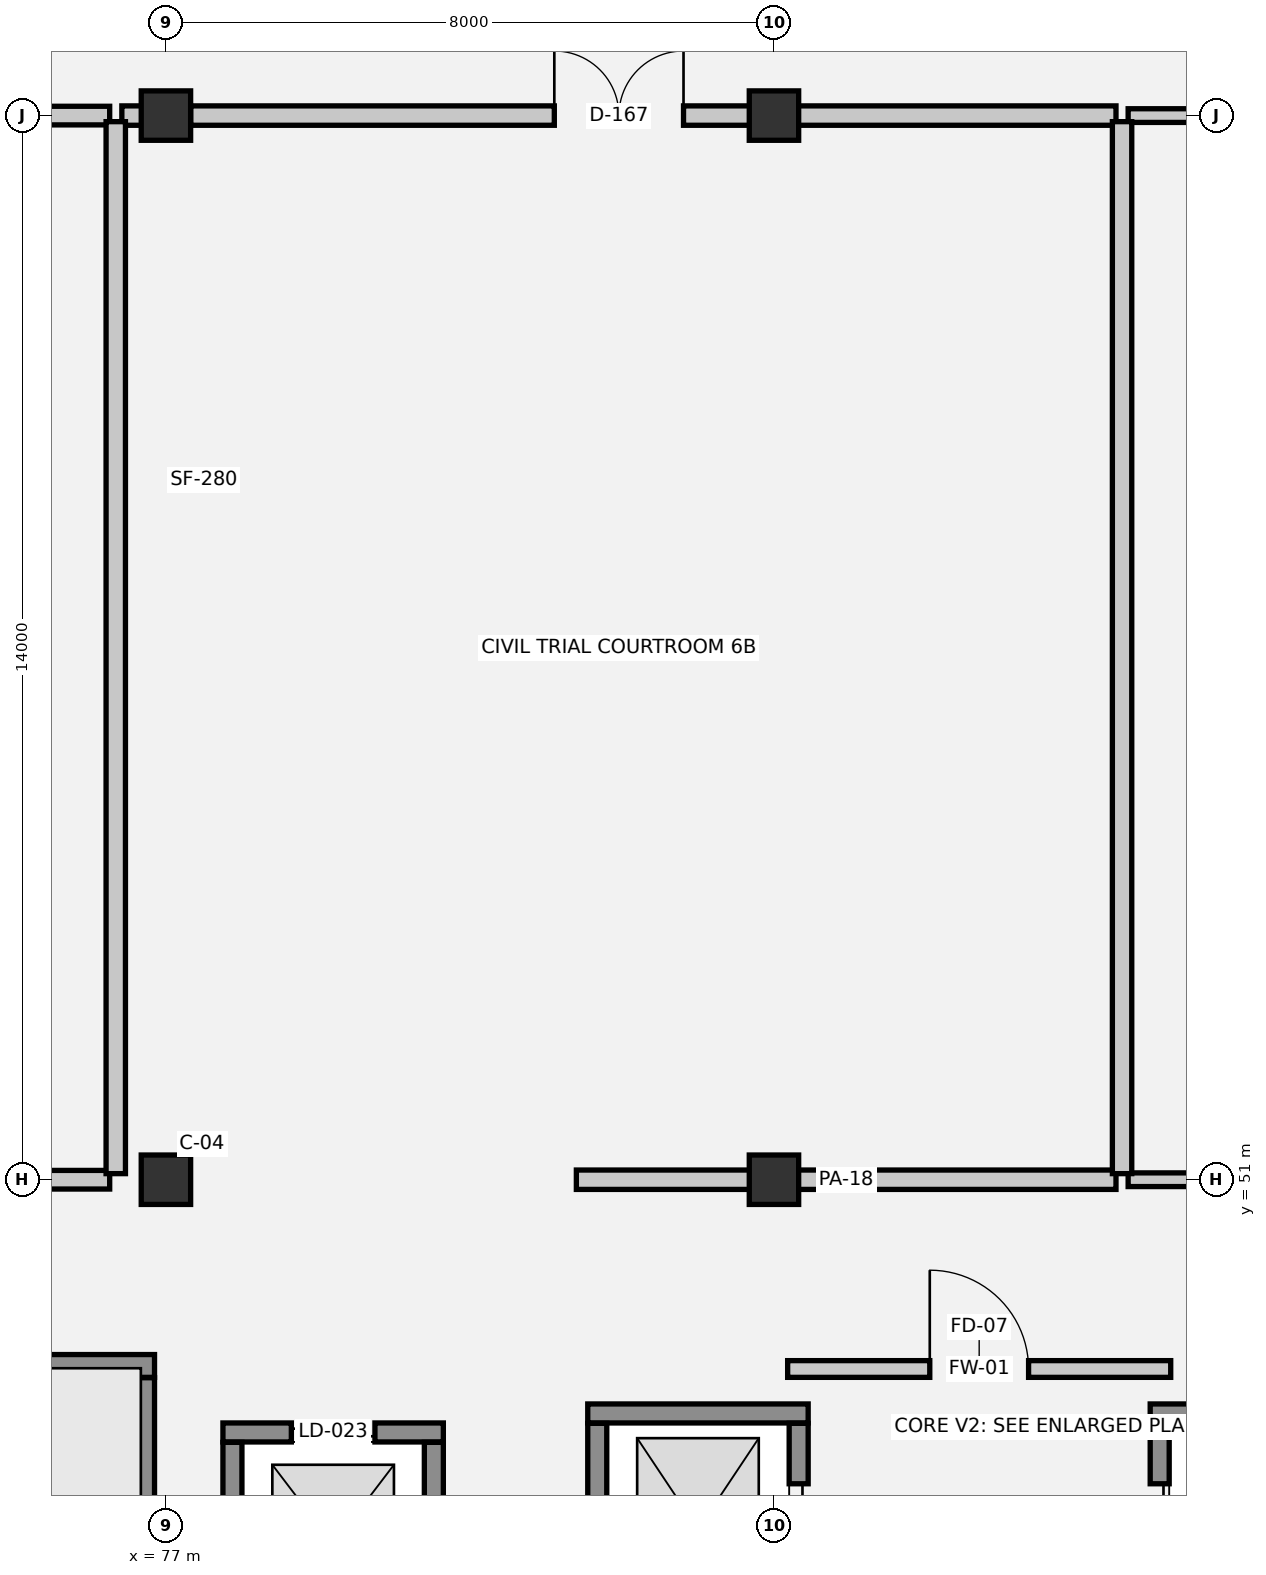
"""IFC4 building model, lengths in metres.
Left out: names, types, materials, properties, quantities, classifications, styles, units other than length and angle.
Written with IfcOpenShell. Run it as: python <this file> out.ifc"""

import sys

from ifc_helpers import new_model, si_unit, direction, frame, frame_2d, origin, origin_2d, place, context, subcontext, project, spatial, rectangle, extrude, element, fill, save


model = new_model("IFC4")
c1 = context("Model", 3, precision=1e-05, world=origin(), true_north=direction((0.0, 1.0)))
c2 = subcontext(c1, "Body", "Model", "MODEL_VIEW")
j1 = project(units=[si_unit("LENGTHUNIT", "METRE"), si_unit("PLANEANGLEUNIT", "RADIAN")], contexts=[c1])
p1 = place(None, origin())
s1 = spatial("IfcSite", under=j1, at=p1, CompositionType="ELEMENT")
p2 = place(p1, origin())
s2 = spatial("IfcBuilding", under=s1, at=p2, CompositionType="ELEMENT")
p3 = place(p2, frame((0.0, 0.0, 22.05)))
s3 = spatial("IfcBuildingStorey", under=s2, at=p3, CompositionType="ELEMENT", Elevation=22.05)
for number, where, z_axis, x_axis in (
    (1, (77.0, 51.0, 0.0), (0.0, 0.0, 1.0), (1.0, 0.0, 0.0)),
    (2, (77.0, 65.0, 0.0), (0.0, 0.0, 1.0), (1.0, 0.0, 0.0)),
    (3, (85.0, 51.0, 0.0), (0.0, 0.0, 1.0), (1.0, 0.0, 0.0)),
    (4, (85.0, 65.0, 0.0), (0.0, 0.0, 1.0), (1.0, 0.0, 0.0)),
):
    element("IfcColumn", number, at=place(p3, frame(where, z_axis=z_axis, x_axis=x_axis)), inside=s3, PredefinedType="COLUMN", context=c2, shape_type="SweptSolid", body=[
        extrude(rectangle(XDim=0.65, YDim=0.65, at=origin_2d()), origin(), (0.0, 0.0, 1.0), 3.75),
    ])
p4 = place(p3, frame((80.65, 47.675, 0.0), z_axis=(0.0, 0.0, 1.0), x_axis=(-1.0, 0.0, 0.0)))
e5 = element("IfcWall", 5, at=p4, inside=s3, PredefinedType="SHEAR", context=c2, shape_type="SweptSolid", body=[
    extrude(rectangle(XDim=2.9, YDim=0.25, at=frame_2d((1.45, 0.0))), origin(), (0.0, 0.0, 1.0), 3.75),
])
p5 = place(p4, frame((0.9, 0.0, 0.0)))
e6 = element("IfcOpeningElement", 6, at=p5, cuts=e5, PredefinedType="OPENING", context=c2, shape_type="SweptSolid", body=[
    extrude(rectangle(XDim=1.1, YDim=2.15, at=frame_2d((0.55, 1.075))), frame((0.0, 0.135, 0.0), z_axis=(0.0, -1.0, 0.0), x_axis=(1.0, 0.0, 0.0)), (0.0, 0.0, 1.0), 0.27),
])
for number, where, z_axis, x_axis in (
    (7, (77.875, 47.545, 0.0), (0.0, 0.0, 1.0), (0.0, -1.0, 0.0)),
    (8, (80.525, 44.855, 0.0), (0.0, 0.0, 1.0), (0.0, 1.0, 0.0)),
):
    element("IfcWall", number, at=place(p3, frame(where, z_axis=z_axis, x_axis=x_axis)), inside=s3, PredefinedType="SHEAR", context=c2, shape_type="SweptSolid", body=[
        extrude(rectangle(XDim=2.69, YDim=0.25, at=frame_2d((1.345, 0.0))), origin(), (0.0, 0.0, 1.0), 3.75),
    ])
p6 = place(p3, frame((85.45, 47.925, 0.0), z_axis=(0.0, 0.0, 1.0), x_axis=(-1.0, 0.0, 0.0)))
e9 = element("IfcWall", 9, at=p6, inside=s3, PredefinedType="SHEAR", context=c2, shape_type="SweptSolid", body=[
    extrude(rectangle(XDim=2.9, YDim=0.25, at=frame_2d((1.45, 0.0))), origin(), (0.0, 0.0, 1.0), 3.75),
])
p7 = place(p3, frame((82.675, 47.795, 0.0), z_axis=(0.0, 0.0, 1.0), x_axis=(0.0, -1.0, 0.0)))
e10 = element("IfcWall", 10, at=p7, inside=s3, PredefinedType="SHEAR", context=c2, shape_type="SweptSolid", body=[
    extrude(rectangle(XDim=2.79, YDim=0.25, at=frame_2d((1.395, 0.0))), origin(), (0.0, 0.0, 1.0), 3.75),
])
p8 = place(p3, frame((85.325, 45.005, 0.0), z_axis=(0.0, 0.0, 1.0), x_axis=(0.0, 1.0, 0.0)))
e11 = element("IfcWall", 11, at=p8, inside=s3, PredefinedType="SHEAR", context=c2, shape_type="SweptSolid", body=[
    extrude(rectangle(XDim=2.79, YDim=0.25, at=frame_2d((1.395, 0.0))), origin(), (0.0, 0.0, 1.0), 3.75),
])
p9 = place(p8, frame((0.795, 0.0, 0.0)))
e12 = element("IfcOpeningElement", 12, at=p9, cuts=e11, PredefinedType="OPENING", context=c2, shape_type="SweptSolid", body=[
    extrude(rectangle(XDim=1.2, YDim=2.2, at=frame_2d((0.6, 1.1))), frame((0.0, 0.135, 0.0), z_axis=(0.0, -1.0, 0.0), x_axis=(1.0, 0.0, 0.0)), (0.0, 0.0, 1.0), 0.27),
])
p10 = place(p3, frame((92.85, 47.925, 0.0), z_axis=(0.0, 0.0, 1.0), x_axis=(-1.0, 0.0, 0.0)))
e13 = element("IfcWall", 13, at=p10, inside=s3, PredefinedType="SHEAR", context=c2, shape_type="SweptSolid", body=[
    extrude(rectangle(XDim=2.9, YDim=0.25, at=frame_2d((1.45, 0.0))), origin(), (0.0, 0.0, 1.0), 3.75),
])
p11 = place(p3, frame((90.075, 47.795, 0.0), z_axis=(0.0, 0.0, 1.0), x_axis=(0.0, -1.0, 0.0)))
e14 = element("IfcWall", 14, at=p11, inside=s3, PredefinedType="SHEAR", context=c2, shape_type="SweptSolid", body=[
    extrude(rectangle(XDim=2.79, YDim=0.25, at=frame_2d((1.395, 0.0))), origin(), (0.0, 0.0, 1.0), 3.75),
])
p12 = place(p11, frame((0.795, 0.0, 0.0)))
e15 = element("IfcOpeningElement", 15, at=p12, cuts=e14, PredefinedType="OPENING", context=c2, shape_type="SweptSolid", body=[
    extrude(rectangle(XDim=1.2, YDim=2.2, at=frame_2d((0.6, 1.1))), frame((0.0, 0.135, 0.0), z_axis=(0.0, -1.0, 0.0), x_axis=(1.0, 0.0, 0.0)), (0.0, 0.0, 1.0), 0.27),
])
p13 = place(p3, frame((76.85, 48.55, 0.0), z_axis=(0.0, 0.0, 1.0), x_axis=(-1.0, 0.0, 0.0)))
e16 = element("IfcWall", 16, at=p13, inside=s3, PredefinedType="SHEAR", context=c2, shape_type="SweptSolid", body=[
    extrude(rectangle(XDim=7.7, YDim=0.3, at=frame_2d((3.85, 0.0))), origin(), (0.0, 0.0, 1.0), 3.47),
])
p14 = place(p13, frame((6.025, 0.0, 0.0)))
e17 = element("IfcOpeningElement", 17, at=p14, cuts=e16, PredefinedType="OPENING", context=c2, shape_type="SweptSolid", body=[
    extrude(rectangle(XDim=1.25, YDim=2.15, at=frame_2d((0.625, 1.075))), frame((0.0, 0.16, 0.0), z_axis=(0.0, -1.0, 0.0), x_axis=(1.0, 0.0, 0.0)), (0.0, 0.0, 1.0), 0.32),
])
p15 = place(p3, frame((76.7, 44.195, 0.0), z_axis=(0.0, 0.0, 1.0), x_axis=(0.0, 1.0, 0.0)))
e18 = element("IfcWall", 18, at=p15, inside=s3, PredefinedType="SHEAR", context=c2, shape_type="SweptSolid", body=[
    extrude(rectangle(XDim=4.2, YDim=0.3, at=frame_2d((2.1, 0.0))), origin(), (0.0, 0.0, 1.0), 3.47),
])
p16 = place(p3, frame((85.18, 48.51, 0.0), z_axis=(0.0, 0.0, 1.0), x_axis=(1.0, 0.0, 0.0)))
e19 = element("IfcWall", 19, at=p16, inside=s3, PredefinedType="SOLIDWALL", context=c2, shape_type="SweptSolid", body=[
    extrude(rectangle(XDim=5.04, YDim=0.22, at=frame_2d((2.52, 0.0))), origin(), (0.0, 0.0, 1.0), 3.47),
])
p17 = place(p16, frame((1.87, 0.0, 0.0)))
e20 = element("IfcOpeningElement", 20, at=p17, cuts=e19, PredefinedType="OPENING", context=c2, shape_type="SweptSolid", body=[
    extrude(rectangle(XDim=1.3, YDim=2.15, at=frame_2d((0.65, 1.075))), frame((0.0, 0.12, 0.0), z_axis=(0.0, -1.0, 0.0), x_axis=(1.0, 0.0, 0.0)), (0.0, 0.0, 1.0), 0.24),
])
p18 = place(p3, frame((62.08, 51.0, 0.0), z_axis=(0.0, 0.0, 1.0), x_axis=(1.0, 0.0, 0.0)))
e21 = element("IfcWall", 21, at=p18, inside=s3, PredefinedType="PARTITIONING", context=c2, shape_type="SweptSolid", body=[
    extrude(rectangle(XDim=14.18, YDim=0.245, at=frame_2d((7.09, 0.0))), origin(), (0.0, 0.0, 1.0), 2.78),
])
p19 = place(p18, frame((4.49, 0.0, 0.0)))
e22 = element("IfcOpeningElement", 22, at=p19, cuts=e21, PredefinedType="OPENING", context=c2, shape_type="SweptSolid", body=[
    extrude(rectangle(XDim=1.65, YDim=2.3, at=frame_2d((0.825, 1.15))), frame((0.0, 0.133, 0.0), z_axis=(0.0, -1.0, 0.0), x_axis=(1.0, 0.0, 0.0)), (0.0, 0.0, 1.0), 0.265),
])
p20 = place(p3, frame((82.4, 51.0, 0.0), z_axis=(0.0, 0.0, 1.0), x_axis=(1.0, 0.0, 0.0)))
e23 = element("IfcWall", 23, at=p20, inside=s3, PredefinedType="PARTITIONING", context=c2, shape_type="SweptSolid", body=[
    extrude(rectangle(XDim=7.1, YDim=0.255, at=frame_2d((3.55, 0.0))), origin(), (0.0, 0.0, 1.0), 2.78),
])
p21 = place(p3, frame((89.66, 51.0, 0.0), z_axis=(0.0, 0.0, 1.0), x_axis=(1.0, 0.0, 0.0)))
e24 = element("IfcWall", 24, at=p21, inside=s3, PredefinedType="PARTITIONING", context=c2, shape_type="SweptSolid", body=[
    extrude(rectangle(XDim=8.66, YDim=0.18, at=frame_2d((4.33, 0.0))), origin(), (0.0, 0.0, 1.0), 2.78),
])
p22 = place(p3, frame((62.08, 65.0, 0.0), z_axis=(0.0, 0.0, 1.0), x_axis=(1.0, 0.0, 0.0)))
e25 = element("IfcWall", 25, at=p22, inside=s3, PredefinedType="PARTITIONING", context=c2, shape_type="SweptSolid", body=[
    extrude(rectangle(XDim=14.18, YDim=0.245, at=frame_2d((7.09, 0.0))), origin(), (0.0, 0.0, 1.0), 2.78),
])
p23 = place(p3, frame((76.42, 65.0, 0.0), z_axis=(0.0, 0.0, 1.0), x_axis=(1.0, 0.0, 0.0)))
e26 = element("IfcWall", 26, at=p23, inside=s3, PredefinedType="PARTITIONING", context=c2, shape_type="SweptSolid", body=[
    extrude(rectangle(XDim=0.905, YDim=0.255, at=frame_2d((0.453, 0.0))), origin(), (0.0, 0.0, 1.0), 3.39),
])
p24 = place(p3, frame((77.325, 65.0, 0.0), z_axis=(0.0, 0.0, 1.0), x_axis=(1.0, 0.0, 0.0)))
e27 = element("IfcWall", 27, at=p24, inside=s3, PredefinedType="PARTITIONING", context=c2, shape_type="SweptSolid", body=[
    extrude(rectangle(XDim=12.175, YDim=0.255, at=frame_2d((6.087, 0.0))), origin(), (0.0, 0.0, 1.0), 2.78),
])
p25 = place(p24, frame((4.785, 0.0, 0.0)))
e28 = element("IfcOpeningElement", 28, at=p25, cuts=e27, PredefinedType="OPENING", context=c2, shape_type="SweptSolid", body=[
    extrude(rectangle(XDim=1.7, YDim=2.3, at=frame_2d((0.85, 1.15))), frame((0.0, 0.137, 0.0), z_axis=(0.0, -1.0, 0.0), x_axis=(1.0, 0.0, 0.0)), (0.0, 0.0, 1.0), 0.275),
])
p26 = place(p3, frame((89.66, 65.0, 0.0), z_axis=(0.0, 0.0, 1.0), x_axis=(1.0, 0.0, 0.0)))
e29 = element("IfcWall", 29, at=p26, inside=s3, PredefinedType="PARTITIONING", context=c2, shape_type="SweptSolid", body=[
    extrude(rectangle(XDim=8.66, YDim=0.18, at=frame_2d((4.33, 0.0))), origin(), (0.0, 0.0, 1.0), 2.78),
])
for number, where, z_axis, x_axis in (
    (30, (76.34, 51.08, 0.0), (0.0, 0.0, 1.0), (0.0, 1.0, 0.0)),
    (31, (89.58, 51.08, 0.0), (0.0, 0.0, 1.0), (0.0, 1.0, 0.0)),
):
    element("IfcWall", number, at=place(p3, frame(where, z_axis=z_axis, x_axis=x_axis)), inside=s3, PredefinedType="PARTITIONING", context=c2, shape_type="SweptSolid", body=[
        extrude(rectangle(XDim=13.84, YDim=0.255, at=frame_2d((6.92, 0.0))), origin(), (0.0, 0.0, 1.0), 3.39),
    ])
p27 = place(p5, origin())
e32 = element("IfcDoor", 32, at=p27, inside=s3, OperationType="DOUBLE_DOOR_SLIDING", PredefinedType="DOOR", context=c2, shape_type="SweptSolid", body=[
    extrude(rectangle(XDim=1.1, YDim=2.15, at=frame_2d((0.55, 1.075))), frame((0.0, 0.025, 0.0), z_axis=(0.0, -1.0, 0.0), x_axis=(1.0, 0.0, 0.0)), (0.0, 0.0, 1.0), 0.05),
])
fill(e6, e32)
p28 = place(p9, origin())
e33 = element("IfcDoor", 33, at=p28, inside=s3, OperationType="DOUBLE_DOOR_SLIDING", PredefinedType="DOOR", context=c2, shape_type="SweptSolid", body=[
    extrude(rectangle(XDim=1.2, YDim=2.2, at=frame_2d((0.6, 1.1))), frame((0.0, 0.025, 0.0), z_axis=(0.0, -1.0, 0.0), x_axis=(1.0, 0.0, 0.0)), (0.0, 0.0, 1.0), 0.05),
])
fill(e12, e33)
p29 = place(p12, origin())
e34 = element("IfcDoor", 34, at=p29, inside=s3, OperationType="DOUBLE_DOOR_SLIDING", PredefinedType="DOOR", context=c2, shape_type="SweptSolid", body=[
    extrude(rectangle(XDim=1.2, YDim=2.2, at=frame_2d((0.6, 1.1))), frame((0.0, 0.025, 0.0), z_axis=(0.0, -1.0, 0.0), x_axis=(1.0, 0.0, 0.0)), (0.0, 0.0, 1.0), 0.05),
])
fill(e15, e34)
p30 = place(p17, origin())
e35 = element("IfcDoor", 35, at=p30, inside=s3, OperationType="SINGLE_SWING_LEFT", PredefinedType="DOOR", context=c2, shape_type="SweptSolid", body=[
    extrude(rectangle(XDim=1.3, YDim=2.15, at=frame_2d((0.65, 1.075))), frame((0.0, 0.025, 0.0), z_axis=(0.0, -1.0, 0.0), x_axis=(1.0, 0.0, 0.0)), (0.0, 0.0, 1.0), 0.05),
])
fill(e20, e35)
p31 = place(p25, origin())
e36 = element("IfcDoor", 36, at=p31, inside=s3, OperationType="DOUBLE_DOOR_SINGLE_SWING", PredefinedType="DOOR", context=c2, shape_type="SweptSolid", body=[
    extrude(rectangle(XDim=1.7, YDim=2.3, at=frame_2d((0.85, 1.15))), frame((0.0, 0.025, 0.0), z_axis=(0.0, -1.0, 0.0), x_axis=(1.0, 0.0, 0.0)), (0.0, 0.0, 1.0), 0.05),
])
fill(e28, e36)
save(model, sys.argv[1])
